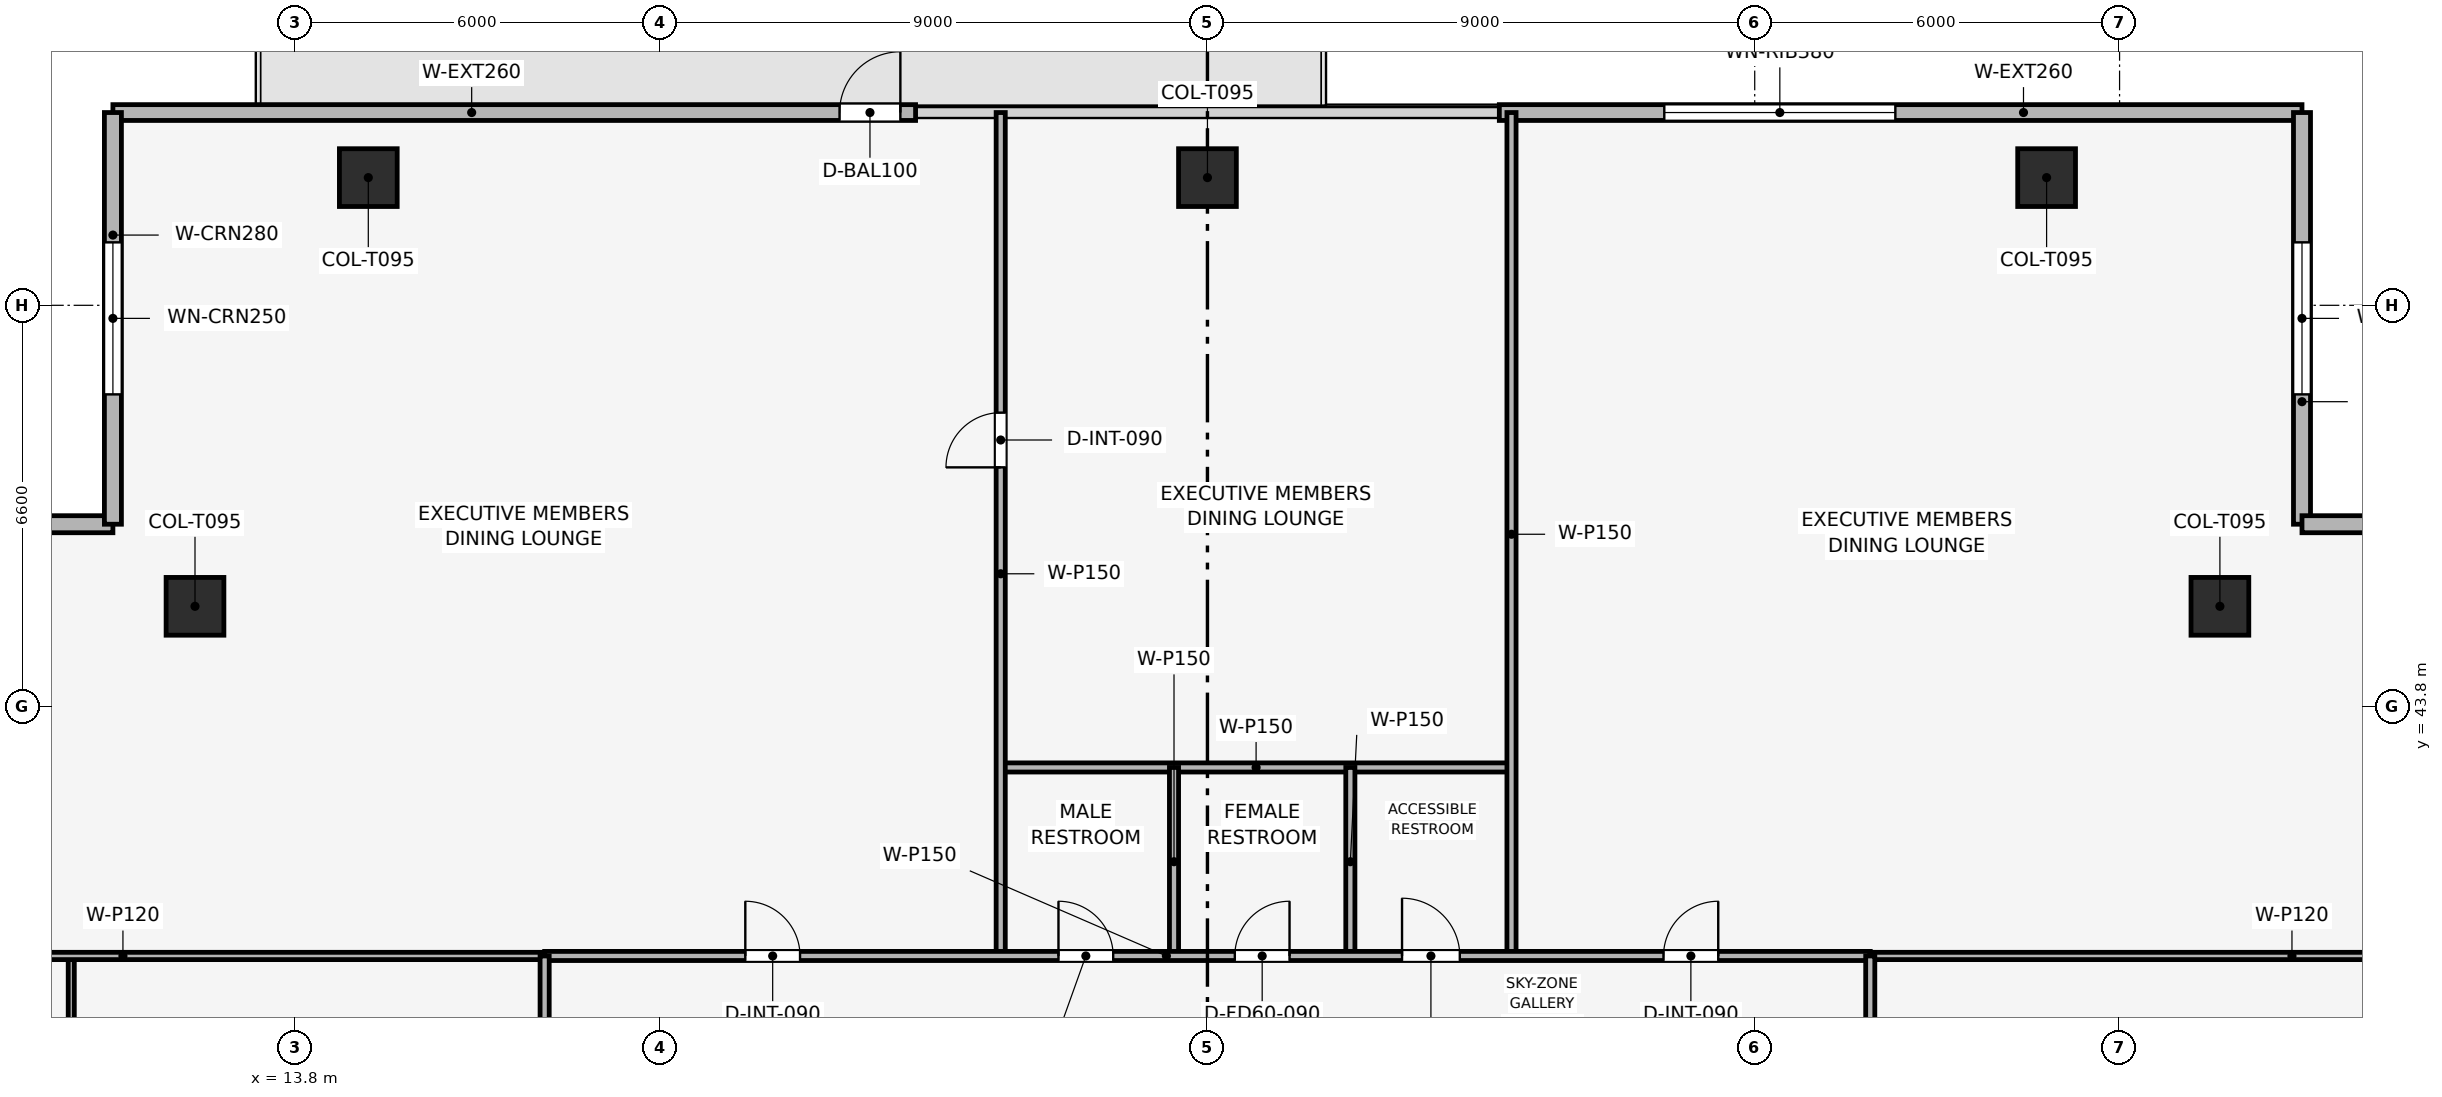
"""IFC4 building model, lengths in metres.
Left out: names, types, materials, properties, quantities, classifications, styles, units other than length and angle.
Written with IfcOpenShell. Run it as: python <this file> out.ifc"""

import sys

from ifc_helpers import new_model, si_unit, direction, frame, frame_2d, origin, origin_2d, place, context, subcontext, project, spatial, rectangle, extrude, element, fill, save


model = new_model("IFC4")
c1 = context("Model", 3, precision=1e-05, world=origin(), true_north=direction((0.0, 1.0)))
c2 = subcontext(c1, "Body", "Model", "MODEL_VIEW")
j1 = project(units=[si_unit("LENGTHUNIT", "METRE"), si_unit("PLANEANGLEUNIT", "RADIAN")], contexts=[c1])
p1 = place(None, origin())
s1 = spatial("IfcSite", under=j1, at=p1, CompositionType="ELEMENT")
p2 = place(p1, origin())
s2 = spatial("IfcBuilding", under=s1, at=p2, CompositionType="ELEMENT")
p3 = place(p2, frame((0.0, 0.0, 272.85)))
s3 = spatial("IfcBuildingStorey", under=s2, at=p3, CompositionType="ELEMENT", Elevation=272.85)
for number, where, z_axis, x_axis in (
    (1, (42.6, 52.5, 0.003), (0.0, 0.0, 1.0), (1.0, 0.0, 0.0)),
    (2, (28.8, 52.5, 0.003), (0.0, 0.0, 1.0), (1.0, 0.0, 0.0)),
    (3, (15.0, 52.5, 0.003), (0.0, 0.0, 1.0), (1.0, 0.0, 0.0)),
    (4, (45.45, 45.45, 0.003), (0.0, 0.0, 1.0), (1.0, 0.0, 0.0)),
    (5, (12.15, 45.45, 0.003), (0.0, 0.0, 1.0), (1.0, 0.0, 0.0)),
):
    element("IfcColumn", number, at=place(p3, frame(where, z_axis=z_axis, x_axis=x_axis)), inside=s3, PredefinedType="COLUMN", context=c2, shape_type="SweptSolid", body=[
        extrude(rectangle(XDim=0.95, YDim=0.95, at=origin_2d()), origin(), (0.0, 0.0, 1.0), 3.494),
    ])
p4 = place(p3, frame((10.8, 53.57, 0.0), z_axis=(0.0, 0.0, 1.0), x_axis=(1.0, 0.0, 0.0)))
e6 = element("IfcWall", 6, at=p4, inside=s3, PredefinedType="SOLIDWALL", context=c2, shape_type="SweptSolid", body=[
    extrude(rectangle(XDim=13.2, YDim=0.26, at=frame_2d((6.6, 0.0))), origin(), (0.0, 0.0, 1.0), 3.5),
])
p5 = place(p4, frame((11.95, 0.0, 0.0)))
e7 = element("IfcOpeningElement", 7, at=p5, cuts=e6, PredefinedType="OPENING", context=c2, shape_type="SweptSolid", body=[
    extrude(rectangle(XDim=1.0, YDim=2.2, at=frame_2d((0.5, 1.1))), frame((0.0, 0.14, 0.0), z_axis=(0.0, -1.0, 0.0), x_axis=(1.0, 0.0, 0.0)), (0.0, 0.0, 1.0), 0.28),
])
p6 = place(p3, frame((33.6, 53.57, 0.0), z_axis=(0.0, 0.0, 1.0), x_axis=(1.0, 0.0, 0.0)))
e8 = element("IfcWall", 8, at=p6, inside=s3, PredefinedType="SOLIDWALL", context=c2, shape_type="SweptSolid", body=[
    extrude(rectangle(XDim=13.2, YDim=0.26, at=frame_2d((6.6, 0.0))), origin(), (0.0, 0.0, 1.0), 3.5),
])
p7 = place(p6, frame((2.713, 0.0, 0.9)))
e9 = element("IfcOpeningElement", 9, at=p7, cuts=e8, PredefinedType="OPENING", context=c2, shape_type="SweptSolid", body=[
    extrude(rectangle(XDim=3.8, YDim=1.9, at=frame_2d((1.9, 0.95))), frame((0.0, 0.14, 0.0), z_axis=(0.0, -1.0, 0.0), x_axis=(1.0, 0.0, 0.0)), (0.0, 0.0, 1.0), 0.28),
])
p8 = place(p3, frame((4.03, 46.8, 0.0), z_axis=(0.0, 0.0, 1.0), x_axis=(1.0, 0.0, 0.0)))
e10 = element("IfcWall", 10, at=p8, inside=s3, PredefinedType="SOLIDWALL", context=c2, shape_type="SweptSolid", body=[
    extrude(rectangle(XDim=6.77, YDim=0.28, at=frame_2d((3.385, 0.0))), origin(), (0.0, 0.0, 1.0), 3.5),
])
p9 = place(p8, frame((2.135, 0.0, 0.9)))
e11 = element("IfcOpeningElement", 11, at=p9, cuts=e10, PredefinedType="OPENING", context=c2, shape_type="SweptSolid", body=[
    extrude(rectangle(XDim=2.5, YDim=1.9, at=frame_2d((1.25, 0.95))), frame((0.0, 0.15, 0.0), z_axis=(0.0, -1.0, 0.0), x_axis=(1.0, 0.0, 0.0)), (0.0, 0.0, 1.0), 0.3),
])
p10 = place(p3, frame((10.8, 46.8, 0.0), z_axis=(0.0, 0.0, 1.0), x_axis=(0.0, 1.0, 0.0)))
e12 = element("IfcWall", 12, at=p10, inside=s3, PredefinedType="SOLIDWALL", context=c2, shape_type="SweptSolid", body=[
    extrude(rectangle(XDim=6.77, YDim=0.28, at=frame_2d((3.385, 0.0))), origin(), (0.0, 0.0, 1.0), 3.5),
])
p11 = place(p10, frame((2.135, 0.0, 0.9)))
e13 = element("IfcOpeningElement", 13, at=p11, cuts=e12, PredefinedType="OPENING", context=c2, shape_type="SweptSolid", body=[
    extrude(rectangle(XDim=2.5, YDim=1.9, at=frame_2d((1.25, 0.95))), frame((0.0, 0.15, 0.0), z_axis=(0.0, -1.0, 0.0), x_axis=(1.0, 0.0, 0.0)), (0.0, 0.0, 1.0), 0.3),
])
p12 = place(p3, frame((46.8, 53.57, 0.0), z_axis=(0.0, 0.0, 1.0), x_axis=(0.0, -1.0, 0.0)))
e14 = element("IfcWall", 14, at=p12, inside=s3, PredefinedType="SOLIDWALL", context=c2, shape_type="SweptSolid", body=[
    extrude(rectangle(XDim=6.77, YDim=0.28, at=frame_2d((3.385, 0.0))), origin(), (0.0, 0.0, 1.0), 3.5),
])
p13 = place(p12, frame((2.135, 0.0, 0.9)))
e15 = element("IfcOpeningElement", 15, at=p13, cuts=e14, PredefinedType="OPENING", context=c2, shape_type="SweptSolid", body=[
    extrude(rectangle(XDim=2.5, YDim=1.9, at=frame_2d((1.25, 0.95))), frame((0.0, 0.15, 0.0), z_axis=(0.0, -1.0, 0.0), x_axis=(1.0, 0.0, 0.0)), (0.0, 0.0, 1.0), 0.3),
])
p14 = place(p3, frame((46.8, 46.8, 0.0), z_axis=(0.0, 0.0, 1.0), x_axis=(1.0, 0.0, 0.0)))
e16 = element("IfcWall", 16, at=p14, inside=s3, PredefinedType="SOLIDWALL", context=c2, shape_type="SweptSolid", body=[
    extrude(rectangle(XDim=6.77, YDim=0.28, at=frame_2d((3.385, 0.0))), origin(), (0.0, 0.0, 1.0), 3.5),
])
p15 = place(p14, frame((2.135, 0.0, 0.9)))
e17 = element("IfcOpeningElement", 17, at=p15, cuts=e16, PredefinedType="OPENING", context=c2, shape_type="SweptSolid", body=[
    extrude(rectangle(XDim=2.5, YDim=1.9, at=frame_2d((1.25, 0.95))), frame((0.0, 0.15, 0.0), z_axis=(0.0, -1.0, 0.0), x_axis=(1.0, 0.0, 0.0)), (0.0, 0.0, 1.0), 0.3),
])
p16 = place(p3, frame((25.4, 42.8, 0.0), z_axis=(0.0, 0.0, 1.0), x_axis=(1.0, 0.0, 0.0)))
e18 = element("IfcWall", 18, at=p16, inside=s3, PredefinedType="PARTITIONING", context=c2, shape_type="SweptSolid", body=[
    extrude(rectangle(XDim=8.4, YDim=0.15, at=frame_2d((4.2, 0.0))), origin(), (0.0, 0.0, 1.0), 3.085),
])
p17 = place(p3, frame((25.4, 39.7, 0.0), z_axis=(0.0, 0.0, 1.0), x_axis=(0.0, 1.0, 0.0)))
e19 = element("IfcWall", 19, at=p17, inside=s3, PredefinedType="PARTITIONING", context=c2, shape_type="SweptSolid", body=[
    extrude(rectangle(XDim=13.87, YDim=0.15, at=frame_2d((6.935, 0.0))), origin(), (0.0, 0.0, 1.0), 3.085),
])
p18 = place(p17, frame((8.035, 0.0, 0.0)))
e20 = element("IfcOpeningElement", 20, at=p18, cuts=e19, PredefinedType="OPENING", context=c2, shape_type="SweptSolid", body=[
    extrude(rectangle(XDim=0.9, YDim=2.1, at=frame_2d((0.45, 1.05))), frame((0.0, 0.085, 0.0), z_axis=(0.0, -1.0, 0.0), x_axis=(1.0, 0.0, 0.0)), (0.0, 0.0, 1.0), 0.17),
])
p19 = place(p3, frame((33.8, 39.7, 0.0), z_axis=(0.0, 0.0, 1.0), x_axis=(0.0, 1.0, 0.0)))
e21 = element("IfcWall", 21, at=p19, inside=s3, PredefinedType="PARTITIONING", context=c2, shape_type="SweptSolid", body=[
    extrude(rectangle(XDim=13.87, YDim=0.15, at=frame_2d((6.935, 0.0))), origin(), (0.0, 0.0, 1.0), 3.085),
])
for number, where, z_axis, x_axis in (
    (22, (28.25, 39.7, 0.0), (0.0, 0.0, 1.0), (0.0, 1.0, 0.0)),
    (23, (31.15, 39.7, 0.0), (0.0, 0.0, 1.0), (0.0, 1.0, 0.0)),
):
    element("IfcWall", number, at=place(p3, frame(where, z_axis=z_axis, x_axis=x_axis)), inside=s3, PredefinedType="PARTITIONING", context=c2, shape_type="SweptSolid", body=[
        extrude(rectangle(XDim=3.1, YDim=0.15, at=frame_2d((1.55, 0.0))), origin(), (0.0, 0.0, 1.0), 3.5),
    ])
p20 = place(p3, frame((10.115, 29.235, 0.0), z_axis=(0.0, 0.0, 1.0), x_axis=(0.0, 1.0, 0.0)))
e24 = element("IfcWall", 24, at=p20, inside=s3, PredefinedType="MOVABLE", context=c2, shape_type="SweptSolid", body=[
    extrude(rectangle(XDim=10.465, YDim=0.1, at=frame_2d((5.232, 0.0))), origin(), (0.0, 0.0, 1.0), 3.085),
])
p21 = place(p20, frame((5.928, 0.0, 0.0)))
e25 = element("IfcOpeningElement", 25, at=p21, cuts=e24, PredefinedType="OPENING", context=c2, shape_type="SweptSolid", body=[
    extrude(rectangle(XDim=0.9, YDim=2.1, at=frame_2d((0.45, 1.05))), frame((0.0, 0.06, 0.0), z_axis=(0.0, -1.0, 0.0), x_axis=(1.0, 0.0, 0.0)), (0.0, 0.0, 1.0), 0.12),
])
p22 = place(p3, frame((4.03, 39.7, 0.0), z_axis=(0.0, 0.0, 1.0), x_axis=(1.0, 0.0, 0.0)))
e26 = element("IfcWall", 26, at=p22, inside=s3, PredefinedType="PARTITIONING", context=c2, shape_type="SweptSolid", body=[
    extrude(rectangle(XDim=13.87, YDim=0.12, at=frame_2d((6.935, 0.0))), origin(), (0.0, 0.0, 1.0), 3.085),
])
p23 = place(p3, frame((39.7, 39.7, 0.0), z_axis=(0.0, 0.0, 1.0), x_axis=(1.0, 0.0, 0.0)))
e27 = element("IfcWall", 27, at=p23, inside=s3, PredefinedType="PARTITIONING", context=c2, shape_type="SweptSolid", body=[
    extrude(rectangle(XDim=13.87, YDim=0.12, at=frame_2d((6.935, 0.0))), origin(), (0.0, 0.0, 1.0), 3.085),
])
p24 = place(p3, frame((17.9, 39.7, 0.0), z_axis=(0.0, 0.0, 1.0), x_axis=(1.0, 0.0, 0.0)))
e28 = element("IfcWall", 28, at=p24, inside=s3, PredefinedType="PARTITIONING", context=c2, shape_type="SweptSolid", body=[
    extrude(rectangle(XDim=21.8, YDim=0.15, at=frame_2d((10.9, 0.0))), origin(), (0.0, 0.0, 1.0), 3.085),
])
p25 = place(p24, frame((3.3, 0.0, 0.0)))
e29 = element("IfcOpeningElement", 29, at=p25, cuts=e28, PredefinedType="OPENING", context=c2, shape_type="SweptSolid", body=[
    extrude(rectangle(XDim=0.9, YDim=2.1, at=frame_2d((0.45, 1.05))), frame((0.0, 0.085, 0.0), z_axis=(0.0, -1.0, 0.0), x_axis=(1.0, 0.0, 0.0)), (0.0, 0.0, 1.0), 0.17),
])
p26 = place(p24, frame((8.45, 0.0, 0.0)))
e30 = element("IfcOpeningElement", 30, at=p26, cuts=e28, PredefinedType="OPENING", context=c2, shape_type="SweptSolid", body=[
    extrude(rectangle(XDim=0.9, YDim=2.1, at=frame_2d((0.45, 1.05))), frame((0.0, 0.085, 0.0), z_axis=(0.0, -1.0, 0.0), x_axis=(1.0, 0.0, 0.0)), (0.0, 0.0, 1.0), 0.17),
])
p27 = place(p24, frame((11.35, 0.0, 0.0)))
e31 = element("IfcOpeningElement", 31, at=p27, cuts=e28, PredefinedType="OPENING", context=c2, shape_type="SweptSolid", body=[
    extrude(rectangle(XDim=0.9, YDim=2.1, at=frame_2d((0.45, 1.05))), frame((0.0, 0.085, 0.0), z_axis=(0.0, -1.0, 0.0), x_axis=(1.0, 0.0, 0.0)), (0.0, 0.0, 1.0), 0.17),
])
p28 = place(p24, frame((14.1, 0.0, 0.0)))
e32 = element("IfcOpeningElement", 32, at=p28, cuts=e28, PredefinedType="OPENING", context=c2, shape_type="SweptSolid", body=[
    extrude(rectangle(XDim=0.95, YDim=2.1, at=frame_2d((0.475, 1.05))), frame((0.0, 0.085, 0.0), z_axis=(0.0, -1.0, 0.0), x_axis=(1.0, 0.0, 0.0)), (0.0, 0.0, 1.0), 0.17),
])
p29 = place(p24, frame((18.4, 0.0, 0.0)))
e33 = element("IfcOpeningElement", 33, at=p29, cuts=e28, PredefinedType="OPENING", context=c2, shape_type="SweptSolid", body=[
    extrude(rectangle(XDim=0.9, YDim=2.1, at=frame_2d((0.45, 1.05))), frame((0.0, 0.085, 0.0), z_axis=(0.0, -1.0, 0.0), x_axis=(1.0, 0.0, 0.0)), (0.0, 0.0, 1.0), 0.17),
])
p30 = place(p3, frame((17.9, 10.8, 0.0), z_axis=(0.0, 0.0, 1.0), x_axis=(0.0, 1.0, 0.0)))
e34 = element("IfcWall", 34, at=p30, inside=s3, PredefinedType="PARTITIONING", context=c2, shape_type="SweptSolid", body=[
    extrude(rectangle(XDim=28.9, YDim=0.15, at=frame_2d((14.45, 0.0))), origin(), (0.0, 0.0, 1.0), 3.085),
])
p31 = place(p30, frame((0.7, 0.0, 0.0)))
e35 = element("IfcOpeningElement", 35, at=p31, cuts=e34, PredefinedType="OPENING", context=c2, shape_type="SweptSolid", body=[
    extrude(rectangle(XDim=0.9, YDim=2.1, at=frame_2d((0.45, 1.05))), frame((0.0, 0.085, 0.0), z_axis=(0.0, -1.0, 0.0), x_axis=(1.0, 0.0, 0.0)), (0.0, 0.0, 1.0), 0.17),
])
p32 = place(p30, frame((5.952, 0.0, 0.0)))
e36 = element("IfcOpeningElement", 36, at=p32, cuts=e34, PredefinedType="OPENING", context=c2, shape_type="SweptSolid", body=[
    extrude(rectangle(XDim=0.9, YDim=2.1, at=frame_2d((0.45, 1.05))), frame((0.0, 0.085, 0.0), z_axis=(0.0, -1.0, 0.0), x_axis=(1.0, 0.0, 0.0)), (0.0, 0.0, 1.0), 0.17),
])
p33 = place(p30, frame((14.02, 0.0, 0.0)))
e37 = element("IfcOpeningElement", 37, at=p33, cuts=e34, PredefinedType="OPENING", context=c2, shape_type="SweptSolid", body=[
    extrude(rectangle(XDim=0.9, YDim=2.1, at=frame_2d((0.45, 1.05))), frame((0.0, 0.085, 0.0), z_axis=(0.0, -1.0, 0.0), x_axis=(1.0, 0.0, 0.0)), (0.0, 0.0, 1.0), 0.17),
])
p34 = place(p30, frame((23.217, 0.0, 0.0)))
e38 = element("IfcOpeningElement", 38, at=p34, cuts=e34, PredefinedType="OPENING", context=c2, shape_type="SweptSolid", body=[
    extrude(rectangle(XDim=0.9, YDim=2.1, at=frame_2d((0.45, 1.05))), frame((0.0, 0.085, 0.0), z_axis=(0.0, -1.0, 0.0), x_axis=(1.0, 0.0, 0.0)), (0.0, 0.0, 1.0), 0.17),
])
p35 = place(p3, frame((39.7, 24.4, 0.0), z_axis=(0.0, 0.0, 1.0), x_axis=(0.0, 1.0, 0.0)))
e39 = element("IfcWall", 39, at=p35, inside=s3, PredefinedType="PARTITIONING", context=c2, shape_type="SweptSolid", body=[
    extrude(rectangle(XDim=15.3, YDim=0.15, at=frame_2d((7.65, 0.0))), origin(), (0.0, 0.0, 1.0), 3.085),
])
p36 = place(p35, frame((3.032, 0.0, 0.0)))
e40 = element("IfcOpeningElement", 40, at=p36, cuts=e39, PredefinedType="OPENING", context=c2, shape_type="SweptSolid", body=[
    extrude(rectangle(XDim=0.9, YDim=2.1, at=frame_2d((0.45, 1.05))), frame((0.0, 0.085, 0.0), z_axis=(0.0, -1.0, 0.0), x_axis=(1.0, 0.0, 0.0)), (0.0, 0.0, 1.0), 0.17),
])
p37 = place(p35, frame((10.682, 0.0, 0.0)))
e41 = element("IfcOpeningElement", 41, at=p37, cuts=e39, PredefinedType="OPENING", context=c2, shape_type="SweptSolid", body=[
    extrude(rectangle(XDim=0.9, YDim=2.1, at=frame_2d((0.45, 1.05))), frame((0.0, 0.085, 0.0), z_axis=(0.0, -1.0, 0.0), x_axis=(1.0, 0.0, 0.0)), (0.0, 0.0, 1.0), 0.17),
])
p38 = place(p5, origin())
e42 = element("IfcDoor", 42, at=p38, inside=s3, OperationType="SINGLE_SWING_RIGHT", PredefinedType="DOOR", context=c2, shape_type="SweptSolid", body=[
    extrude(rectangle(XDim=1.0, YDim=2.2, at=frame_2d((0.5, 1.1))), frame((0.0, 0.025, 0.0), z_axis=(0.0, -1.0, 0.0), x_axis=(1.0, 0.0, 0.0)), (0.0, 0.0, 1.0), 0.05),
])
fill(e7, e42)
p39 = place(p7, origin())
e43 = element("IfcWindow", 43, at=p39, inside=s3, PartitioningType="SINGLE_PANEL", PredefinedType="WINDOW", context=c2, shape_type="SweptSolid", body=[
    extrude(rectangle(XDim=3.8, YDim=1.9, at=frame_2d((1.9, 0.95))), frame((0.0, 0.03, 0.0), z_axis=(0.0, -1.0, 0.0), x_axis=(1.0, 0.0, 0.0)), (0.0, 0.0, 1.0), 0.06),
])
fill(e9, e43)
p40 = place(p11, origin())
e44 = element("IfcWindow", 44, at=p40, inside=s3, PartitioningType="SINGLE_PANEL", PredefinedType="WINDOW", context=c2, shape_type="SweptSolid", body=[
    extrude(rectangle(XDim=2.5, YDim=1.9, at=frame_2d((1.25, 0.95))), frame((0.0, 0.03, 0.0), z_axis=(0.0, -1.0, 0.0), x_axis=(1.0, 0.0, 0.0)), (0.0, 0.0, 1.0), 0.06),
])
fill(e13, e44)
p41 = place(p13, origin())
e45 = element("IfcWindow", 45, at=p41, inside=s3, PartitioningType="SINGLE_PANEL", PredefinedType="WINDOW", context=c2, shape_type="SweptSolid", body=[
    extrude(rectangle(XDim=2.5, YDim=1.9, at=frame_2d((1.25, 0.95))), frame((0.0, 0.03, 0.0), z_axis=(0.0, -1.0, 0.0), x_axis=(1.0, 0.0, 0.0)), (0.0, 0.0, 1.0), 0.06),
])
fill(e15, e45)
p42 = place(p18, origin())
e46 = element("IfcDoor", 46, at=p42, inside=s3, OperationType="SINGLE_SWING_LEFT", PredefinedType="DOOR", context=c2, shape_type="SweptSolid", body=[
    extrude(rectangle(XDim=0.9, YDim=2.1, at=frame_2d((0.45, 1.05))), frame((0.0, 0.025, 0.0), z_axis=(0.0, -1.0, 0.0), x_axis=(1.0, 0.0, 0.0)), (0.0, 0.0, 1.0), 0.05),
])
fill(e20, e46)
p43 = place(p25, origin())
e47 = element("IfcDoor", 47, at=p43, inside=s3, OperationType="SINGLE_SWING_LEFT", PredefinedType="DOOR", context=c2, shape_type="SweptSolid", body=[
    extrude(rectangle(XDim=0.9, YDim=2.1, at=frame_2d((0.45, 1.05))), frame((0.0, 0.025, 0.0), z_axis=(0.0, -1.0, 0.0), x_axis=(1.0, 0.0, 0.0)), (0.0, 0.0, 1.0), 0.05),
])
fill(e29, e47)
p44 = place(p26, origin())
e48 = element("IfcDoor", 48, at=p44, inside=s3, OperationType="SINGLE_SWING_LEFT", PredefinedType="DOOR", context=c2, shape_type="SweptSolid", body=[
    extrude(rectangle(XDim=0.9, YDim=2.1, at=frame_2d((0.45, 1.05))), frame((0.0, 0.025, 0.0), z_axis=(0.0, -1.0, 0.0), x_axis=(1.0, 0.0, 0.0)), (0.0, 0.0, 1.0), 0.05),
])
fill(e30, e48)
p45 = place(p27, origin())
e49 = element("IfcDoor", 49, at=p45, inside=s3, OperationType="SINGLE_SWING_RIGHT", PredefinedType="DOOR", context=c2, shape_type="SweptSolid", body=[
    extrude(rectangle(XDim=0.9, YDim=2.1, at=frame_2d((0.45, 1.05))), frame((0.0, 0.025, 0.0), z_axis=(0.0, -1.0, 0.0), x_axis=(1.0, 0.0, 0.0)), (0.0, 0.0, 1.0), 0.05),
])
fill(e31, e49)
p46 = place(p28, origin())
e50 = element("IfcDoor", 50, at=p46, inside=s3, OperationType="SINGLE_SWING_LEFT", PredefinedType="DOOR", context=c2, shape_type="SweptSolid", body=[
    extrude(rectangle(XDim=0.95, YDim=2.1, at=frame_2d((0.475, 1.05))), frame((0.0, 0.025, 0.0), z_axis=(0.0, -1.0, 0.0), x_axis=(1.0, 0.0, 0.0)), (0.0, 0.0, 1.0), 0.05),
])
fill(e32, e50)
p47 = place(p29, origin())
e51 = element("IfcDoor", 51, at=p47, inside=s3, OperationType="SINGLE_SWING_RIGHT", PredefinedType="DOOR", context=c2, shape_type="SweptSolid", body=[
    extrude(rectangle(XDim=0.9, YDim=2.1, at=frame_2d((0.45, 1.05))), frame((0.0, 0.025, 0.0), z_axis=(0.0, -1.0, 0.0), x_axis=(1.0, 0.0, 0.0)), (0.0, 0.0, 1.0), 0.05),
])
fill(e33, e51)
save(model, sys.argv[1])
